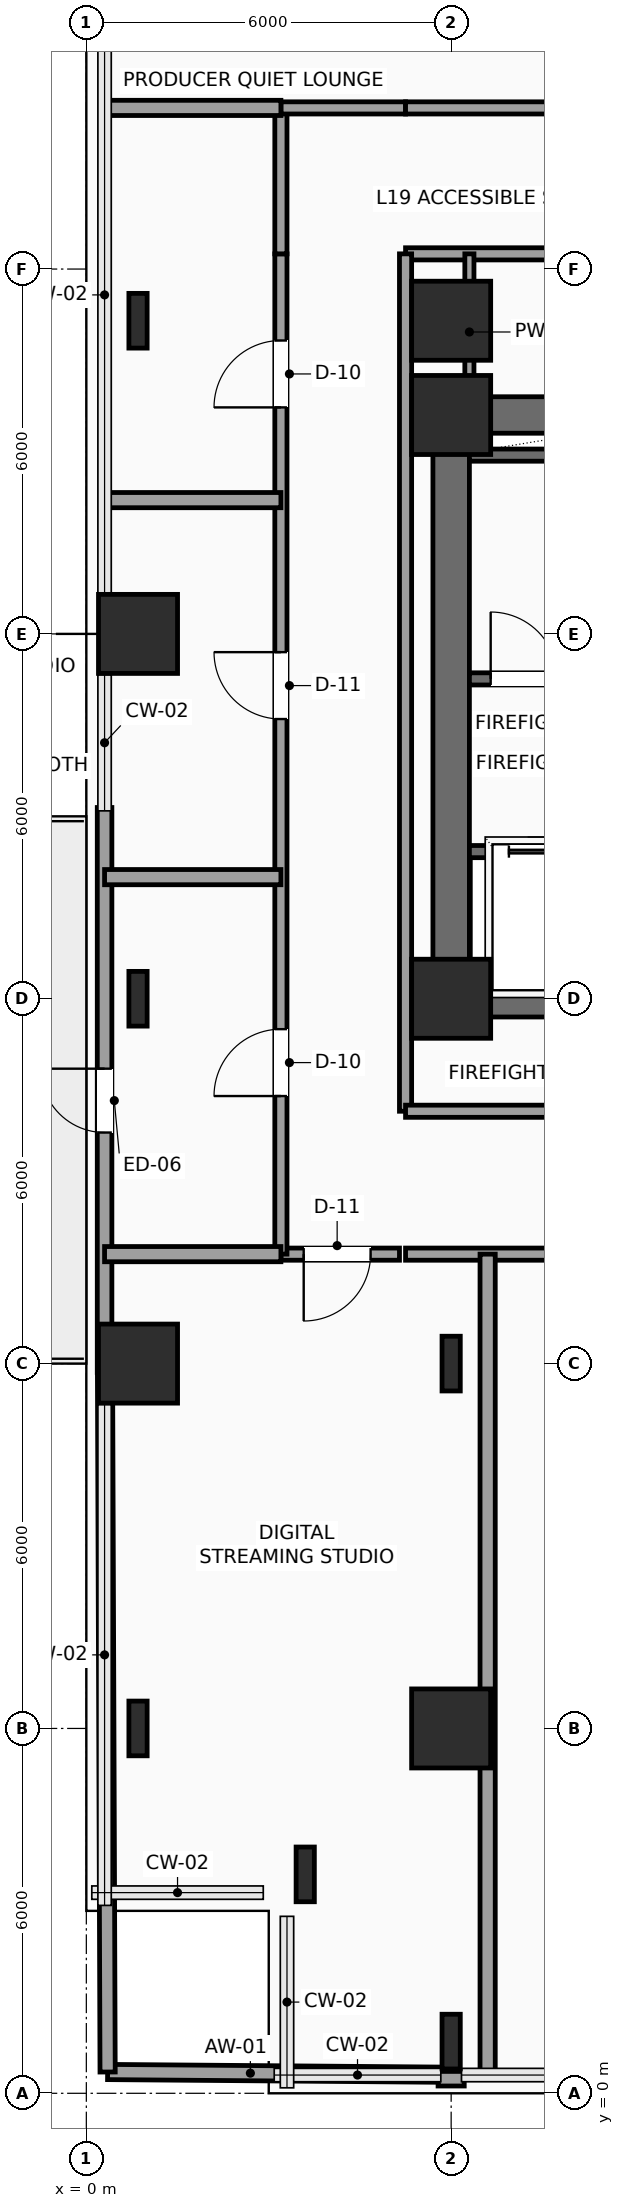
"""IFC4 building model, lengths in metres.
Left out: names, types, materials, properties, quantities, classifications, styles, units other than length and angle.
Written with IfcOpenShell. Run it as: python <this file> out.ifc"""

import sys

from ifc_helpers import new_model, si_unit, direction, frame, frame_2d, origin, origin_2d, place, context, subcontext, project, spatial, rectangle, i_section, extrude, element, fill, save


model = new_model("IFC4")
c1 = context("Model", 3, precision=1e-05, world=origin(), true_north=direction((0.0, 1.0)))
c2 = subcontext(c1, "Body", "Model", "MODEL_VIEW")
j1 = project(units=[si_unit("LENGTHUNIT", "METRE"), si_unit("PLANEANGLEUNIT", "RADIAN")], contexts=[c1])
p1 = place(None, origin())
s1 = spatial("IfcSite", under=j1, at=p1, CompositionType="ELEMENT")
p2 = place(p1, origin())
s2 = spatial("IfcBuilding", under=s1, at=p2, CompositionType="ELEMENT")
p3 = place(p2, frame((0.0, 0.0, 83.1)))
s3 = spatial("IfcBuildingStorey", under=s2, at=p3, CompositionType="ELEMENT", Elevation=83.1)
for number, where, z_axis, x_axis in (
    (1, (6.0, 18.0, 0.0), (0.0, 0.0, 1.0), (1.0, 0.0, 0.0)),
    (2, (6.0, 27.6, 0.0), (0.0, 0.0, 1.0), (1.0, 0.0, 0.0)),
):
    element("IfcColumn", number, at=place(p3, frame(where, z_axis=z_axis, x_axis=x_axis)), inside=s3, PredefinedType="COLUMN", context=c2, shape_type="SweptSolid", body=[
        extrude(rectangle(XDim=1.3, YDim=1.3, at=origin_2d()), origin(), (0.0, 0.0, 1.0), 3.9),
    ])
for number, where, z_axis, x_axis in (
    (3, (3.6, 3.6, 0.0), (0.0, 0.0, 1.0), (1.0, 0.0, 0.0)),
    (4, (0.85, 6.0, 0.0), (0.0, 0.0, 1.0), (1.0, 0.0, 0.0)),
):
    element("IfcColumn", number, at=place(p3, frame(where, z_axis=z_axis, x_axis=x_axis)), inside=s3, PredefinedType="COLUMN", context=c2, shape_type="SweptSolid", body=[
        extrude(i_section(OverallWidth=0.3, OverallDepth=0.9, WebThickness=0.019, FlangeThickness=0.035, FilletRadius=0.03, at=origin_2d()), origin(), (0.0, 0.0, 1.0), 3.9),
    ])
p4 = place(p3, frame((0.85, 12.0, 0.0), z_axis=(0.0, 0.0, 1.0), x_axis=(1.0, 0.0, 0.0)))
e5 = element("IfcColumn", 5, at=p4, inside=s3, PredefinedType="COLUMN", context=c2, shape_type="SweptSolid", body=[
    extrude(rectangle(XDim=1.3, YDim=1.3, at=origin_2d()), origin(), (0.0, 0.0, 1.0), 3.9),
])
p5 = place(p3, frame((0.85, 18.0, 0.0), z_axis=(0.0, 0.0, 1.0), x_axis=(1.0, 0.0, 0.0)))
e6 = element("IfcColumn", 6, at=p5, inside=s3, PredefinedType="COLUMN", context=c2, shape_type="SweptSolid", body=[
    extrude(i_section(OverallWidth=0.3, OverallDepth=0.9, WebThickness=0.019, FlangeThickness=0.035, FilletRadius=0.03, at=origin_2d()), origin(), (0.0, 0.0, 1.0), 3.9),
])
p6 = place(p3, frame((0.85, 24.0, 0.0), z_axis=(0.0, 0.0, 1.0), x_axis=(1.0, 0.0, 0.0)))
e7 = element("IfcColumn", 7, at=p6, inside=s3, PredefinedType="COLUMN", context=c2, shape_type="SweptSolid", body=[
    extrude(rectangle(XDim=1.3, YDim=1.3, at=origin_2d()), origin(), (0.0, 0.0, 1.0), 3.9),
])
for number, where, z_axis, x_axis in (
    (8, (0.85, 29.15, 0.0), (0.0, 0.0, 1.0), (1.0, 0.0, 0.0)),
    (9, (6.0, 0.85, 0.0), (0.0, 0.0, 1.0), (1.0, 0.0, 0.0)),
):
    element("IfcColumn", number, at=place(p3, frame(where, z_axis=z_axis, x_axis=x_axis)), inside=s3, PredefinedType="COLUMN", context=c2, shape_type="SweptSolid", body=[
        extrude(i_section(OverallWidth=0.3, OverallDepth=0.9, WebThickness=0.019, FlangeThickness=0.035, FilletRadius=0.03, at=origin_2d()), origin(), (0.0, 0.0, 1.0), 3.9),
    ])
p7 = place(p3, frame((6.0, 6.0, 0.0), z_axis=(0.0, 0.0, 1.0), x_axis=(1.0, 0.0, 0.0)))
e10 = element("IfcColumn", 10, at=p7, inside=s3, PredefinedType="COLUMN", context=c2, shape_type="SweptSolid", body=[
    extrude(rectangle(XDim=1.3, YDim=1.3, at=origin_2d()), origin(), (0.0, 0.0, 1.0), 3.9),
])
p8 = place(p3, frame((6.0, 12.0, 0.0), z_axis=(0.0, 0.0, 1.0), x_axis=(1.0, 0.0, 0.0)))
e11 = element("IfcColumn", 11, at=p8, inside=s3, PredefinedType="COLUMN", context=c2, shape_type="SweptSolid", body=[
    extrude(i_section(OverallWidth=0.3, OverallDepth=0.9, WebThickness=0.019, FlangeThickness=0.035, FilletRadius=0.03, at=origin_2d()), origin(), (0.0, 0.0, 1.0), 3.9),
])
p9 = place(p3, frame((6.0, 29.15, 0.0), z_axis=(0.0, 0.0, 1.0), x_axis=(1.0, 0.0, 0.0)))
e12 = element("IfcColumn", 12, at=p9, inside=s3, PredefinedType="COLUMN", context=c2, shape_type="SweptSolid", body=[
    extrude(rectangle(XDim=1.3, YDim=1.3, at=origin_2d()), origin(), (0.0, 0.0, 1.0), 3.9),
])
p10 = place(p3, frame((0.3, 11.855, 0.0), z_axis=(0.0, 0.0, 1.0), x_axis=(0.0, 1.0, 0.0)))
e13 = element("IfcWall", 13, at=p10, inside=s3, PredefinedType="SOLIDWALL", context=c2, shape_type="SweptSolid", body=[
    extrude(rectangle(XDim=9.29, YDim=0.24, at=frame_2d((4.645, 0.0))), origin(), (0.0, 0.0, 1.0), 3.65),
])
p11 = place(p10, frame((3.945, 0.0, 0.0)))
e14 = element("IfcOpeningElement", 14, at=p11, cuts=e13, PredefinedType="OPENING", context=c2, shape_type="SweptSolid", body=[
    extrude(rectangle(XDim=1.05, YDim=2.2, at=frame_2d((0.525, 1.1))), frame((0.0, 0.13, 0.0), z_axis=(0.0, -1.0, 0.0), x_axis=(1.0, 0.0, 0.0)), (0.0, 0.0, 1.0), 0.26),
])
p12 = place(p3, frame((6.215, 0.24, 0.0), z_axis=(0.0, 0.0, 1.0), x_axis=(-1.0, 0.0, 0.0)))
e15 = element("IfcWall", 15, at=p12, inside=s3, PredefinedType="SOLIDWALL", context=c2, shape_type="SweptSolid", body=[
    extrude(rectangle(XDim=0.43, YDim=0.24, at=frame_2d((0.215, 0.0))), origin(), (0.0, 0.0, 1.0), 3.65),
])
p13 = place(p3, frame((6.0, 18.0, 0.0), z_axis=(0.0, 0.0, 1.0), x_axis=(1.0, 0.0, 0.0)))
e16 = element("IfcWall", 16, at=p13, inside=s3, PredefinedType="SHEAR", context=c2, shape_type="SweptSolid", body=[
    extrude(rectangle(XDim=12.0, YDim=0.6, at=frame_2d((6.0, 0.0))), origin(), (0.0, 0.0, 1.0), 3.65),
])
p14 = place(p13, frame((7.15, 0.0, 0.0)))
e17 = element("IfcOpeningElement", 17, at=p14, cuts=e16, PredefinedType="OPENING", context=c2, shape_type="SweptSolid", body=[
    extrude(rectangle(XDim=1.6, YDim=2.3, at=frame_2d((0.8, 1.15))), frame((0.0, 0.31, 0.0), z_axis=(0.0, -1.0, 0.0), x_axis=(1.0, 0.0, 0.0)), (0.0, 0.0, 1.0), 0.62),
])
p15 = place(p3, frame((6.0, 27.6, 0.0), z_axis=(0.0, 0.0, 1.0), x_axis=(1.0, 0.0, 0.0)))
e18 = element("IfcWall", 18, at=p15, inside=s3, PredefinedType="SHEAR", context=c2, shape_type="SweptSolid", body=[
    extrude(rectangle(XDim=12.0, YDim=0.6, at=frame_2d((6.0, 0.0))), origin(), (0.0, 0.0, 1.0), 3.65),
])
p16 = place(p15, frame((10.2, 0.0, 0.0)))
e19 = element("IfcOpeningElement", 19, at=p16, cuts=e18, PredefinedType="OPENING", context=c2, shape_type="SweptSolid", body=[
    extrude(rectangle(XDim=0.9, YDim=2.15, at=frame_2d((0.45, 1.075))), frame((0.0, 0.31, 0.0), z_axis=(0.0, -1.0, 0.0), x_axis=(1.0, 0.0, 0.0)), (0.0, 0.0, 1.0), 0.62),
])
p17 = place(p3, frame((6.0, 18.0, 0.0), z_axis=(0.0, 0.0, 1.0), x_axis=(0.0, 1.0, 0.0)))
e20 = element("IfcWall", 20, at=p17, inside=s3, PredefinedType="SHEAR", context=c2, shape_type="SweptSolid", body=[
    extrude(rectangle(XDim=9.6, YDim=0.6, at=frame_2d((4.8, 0.0))), origin(), (0.0, 0.0, 1.0), 3.65),
])
p18 = place(p3, frame((6.3, 23.26, 0.0), z_axis=(0.0, 0.0, 1.0), x_axis=(1.0, 0.0, 0.0)))
e21 = element("IfcWall", 21, at=p18, inside=s3, PredefinedType="SHEAR", context=c2, shape_type="SweptSolid", body=[
    extrude(rectangle(XDim=8.88, YDim=0.2, at=frame_2d((4.44, 0.0))), origin(), (0.0, 0.0, 1.0), 3.65),
])
p19 = place(p18, frame((0.35, 0.0, 0.0)))
e22 = element("IfcOpeningElement", 22, at=p19, cuts=e21, PredefinedType="OPENING", context=c2, shape_type="SweptSolid", body=[
    extrude(rectangle(XDim=1.1, YDim=2.2, at=frame_2d((0.55, 1.1))), frame((0.0, 0.11, 0.0), z_axis=(0.0, -1.0, 0.0), x_axis=(1.0, 0.0, 0.0)), (0.0, 0.0, 1.0), 0.22),
])
p20 = place(p3, frame((6.3, 26.94, 0.0), z_axis=(0.0, 0.0, 1.0), x_axis=(1.0, 0.0, 0.0)))
e23 = element("IfcWall", 23, at=p20, inside=s3, PredefinedType="SHEAR", context=c2, shape_type="SweptSolid", body=[
    extrude(rectangle(XDim=8.88, YDim=0.2, at=frame_2d((4.44, 0.0))), origin(), (0.0, 0.0, 1.0), 3.65),
])
p21 = place(p3, frame((6.3, 20.42, 0.0), z_axis=(0.0, 0.0, 1.0), x_axis=(1.0, 0.0, 0.0)))
e24 = element("IfcWall", 24, at=p21, inside=s3, PredefinedType="SHEAR", context=c2, shape_type="SweptSolid", body=[
    extrude(rectangle(XDim=4.95, YDim=0.2, at=frame_2d((2.475, 0.0))), origin(), (0.0, 0.0, 1.0), 3.65),
])
p22 = place(p21, frame((0.65, 0.0, 0.0)))
e25 = element("IfcOpeningElement", 25, at=p22, cuts=e24, PredefinedType="OPENING", context=c2, shape_type="SweptSolid", body=[
    extrude(rectangle(XDim=1.1, YDim=2.2, at=frame_2d((0.55, 1.1))), frame((0.0, 0.11, 0.0), z_axis=(0.0, -1.0, 0.0), x_axis=(1.0, 0.0, 0.0)), (0.0, 0.0, 1.0), 0.22),
])
p23 = place(p21, frame((3.05, 0.0, 0.0)))
e26 = element("IfcOpeningElement", 26, at=p23, cuts=e24, PredefinedType="OPENING", context=c2, shape_type="SweptSolid", body=[
    extrude(rectangle(XDim=1.1, YDim=2.2, at=frame_2d((0.55, 1.1))), frame((0.0, 0.11, 0.0), z_axis=(0.0, -1.0, 0.0), x_axis=(1.0, 0.0, 0.0)), (0.0, 0.0, 1.0), 0.22),
])
p24 = place(p3, frame((12.4, 13.8, 0.0), z_axis=(0.0, 0.0, 1.0), x_axis=(-1.0, 0.0, 0.0)))
e27 = element("IfcWall", 27, at=p24, inside=s3, PredefinedType="PARTITIONING", context=c2, shape_type="SweptSolid", body=[
    extrude(rectangle(XDim=7.15, YDim=0.2, at=frame_2d((3.575, 0.0))), origin(), (0.0, 0.0, 1.0), 3.65),
])
p25 = place(p24, frame((2.4, 0.0, 0.0)))
e28 = element("IfcOpeningElement", 28, at=p25, cuts=e27, PredefinedType="OPENING", context=c2, shape_type="SweptSolid", body=[
    extrude(rectangle(XDim=1.1, YDim=2.25, at=frame_2d((0.55, 1.125))), frame((0.0, 0.11, 0.0), z_axis=(0.0, -1.0, 0.0), x_axis=(1.0, 0.0, 0.0)), (0.0, 0.0, 1.0), 0.22),
])
p26 = place(p3, frame((5.15, 13.8, 0.0), z_axis=(0.0, 0.0, 1.0), x_axis=(-1.0, 0.0, 0.0)))
e29 = element("IfcWall", 29, at=p26, inside=s3, PredefinedType="PARTITIONING", context=c2, shape_type="SweptSolid", body=[
    extrude(rectangle(XDim=1.95, YDim=0.2, at=frame_2d((0.975, 0.0))), origin(), (0.0, 0.0, 1.0), 3.65),
])
p27 = place(p26, frame((0.475, 0.0, 0.0)))
e30 = element("IfcOpeningElement", 30, at=p27, cuts=e29, PredefinedType="OPENING", context=c2, shape_type="SweptSolid", body=[
    extrude(rectangle(XDim=1.1, YDim=2.25, at=frame_2d((0.55, 1.125))), frame((0.0, 0.11, 0.0), z_axis=(0.0, -1.0, 0.0), x_axis=(1.0, 0.0, 0.0)), (0.0, 0.0, 1.0), 0.22),
])
p28 = place(p3, frame((3.2, 13.8, 0.0), z_axis=(0.0, 0.0, 1.0), x_axis=(0.0, 1.0, 0.0)))
e31 = element("IfcWall", 31, at=p28, inside=s3, PredefinedType="PARTITIONING", context=c2, shape_type="SweptSolid", body=[
    extrude(rectangle(XDim=16.45, YDim=0.2, at=frame_2d((8.225, 0.0))), origin(), (0.0, 0.0, 1.0), 3.65),
])
p29 = place(p28, frame((2.6, 0.0, 0.0)))
e32 = element("IfcOpeningElement", 32, at=p29, cuts=e31, PredefinedType="OPENING", context=c2, shape_type="SweptSolid", body=[
    extrude(rectangle(XDim=1.1, YDim=2.25, at=frame_2d((0.55, 1.125))), frame((0.0, 0.11, 0.0), z_axis=(0.0, -1.0, 0.0), x_axis=(1.0, 0.0, 0.0)), (0.0, 0.0, 1.0), 0.22),
])
p30 = place(p28, frame((8.8, 0.0, 0.0)))
e33 = element("IfcOpeningElement", 33, at=p30, cuts=e31, PredefinedType="OPENING", context=c2, shape_type="SweptSolid", body=[
    extrude(rectangle(XDim=1.1, YDim=2.25, at=frame_2d((0.55, 1.125))), frame((0.0, 0.11, 0.0), z_axis=(0.0, -1.0, 0.0), x_axis=(1.0, 0.0, 0.0)), (0.0, 0.0, 1.0), 0.22),
])
p31 = place(p28, frame((13.925, 0.0, 0.0)))
e34 = element("IfcOpeningElement", 34, at=p31, cuts=e31, PredefinedType="OPENING", context=c2, shape_type="SweptSolid", body=[
    extrude(rectangle(XDim=1.1, YDim=2.25, at=frame_2d((0.55, 1.125))), frame((0.0, 0.11, 0.0), z_axis=(0.0, -1.0, 0.0), x_axis=(1.0, 0.0, 0.0)), (0.0, 0.0, 1.0), 0.22),
])
p32 = place(p3, frame((3.2, 30.25, 0.0), z_axis=(0.0, 0.0, 1.0), x_axis=(0.0, 1.0, 0.0)))
e35 = element("IfcWall", 35, at=p32, inside=s3, PredefinedType="PARTITIONING", context=c2, shape_type="SweptSolid", body=[
    extrude(rectangle(XDim=2.4, YDim=0.2, at=frame_2d((1.2, 0.0))), origin(), (0.0, 0.0, 1.0), 3.65),
])
p33 = place(p3, frame((3.2, 32.65, 0.0), z_axis=(0.0, 0.0, 1.0), x_axis=(1.0, 0.0, 0.0)))
e36 = element("IfcWall", 36, at=p33, inside=s3, PredefinedType="PARTITIONING", context=c2, shape_type="SweptSolid", body=[
    extrude(rectangle(XDim=2.05, YDim=0.2, at=frame_2d((1.025, 0.0))), origin(), (0.0, 0.0, 1.0), 3.65),
])
p34 = place(p3, frame((5.25, 32.65, 0.0), z_axis=(0.0, 0.0, 1.0), x_axis=(1.0, 0.0, 0.0)))
e37 = element("IfcWall", 37, at=p34, inside=s3, PredefinedType="PARTITIONING", context=c2, shape_type="SweptSolid", body=[
    extrude(rectangle(XDim=7.35, YDim=0.2, at=frame_2d((3.675, 0.0))), origin(), (0.0, 0.0, 1.0), 3.65),
])
p35 = place(p3, frame((15.88, 30.25, 0.0), z_axis=(0.0, 0.0, 1.0), x_axis=(-1.0, 0.0, 0.0)))
e38 = element("IfcWall", 38, at=p35, inside=s3, PredefinedType="PARTITIONING", context=c2, shape_type="SweptSolid", body=[
    extrude(rectangle(XDim=10.63, YDim=0.2, at=frame_2d((5.315, 0.0))), origin(), (0.0, 0.0, 1.0), 3.65),
])
p36 = place(p35, frame((6.13, 0.0, 0.0)))
e39 = element("IfcOpeningElement", 39, at=p36, cuts=e38, PredefinedType="OPENING", context=c2, shape_type="SweptSolid", body=[
    extrude(rectangle(XDim=0.9, YDim=2.1, at=frame_2d((0.45, 1.05))), frame((0.0, 0.11, 0.0), z_axis=(0.0, -1.0, 0.0), x_axis=(1.0, 0.0, 0.0)), (0.0, 0.0, 1.0), 0.22),
])
p37 = place(p3, frame((5.25, 30.25, 0.0), z_axis=(0.0, 0.0, 1.0), x_axis=(0.0, -1.0, 0.0)))
e40 = element("IfcWall", 40, at=p37, inside=s3, PredefinedType="PARTITIONING", context=c2, shape_type="SweptSolid", body=[
    extrude(rectangle(XDim=14.1, YDim=0.2, at=frame_2d((7.05, 0.0))), origin(), (0.0, 0.0, 1.0), 3.65),
])
p38 = place(p3, frame((5.25, 16.15, 0.0), z_axis=(0.0, 0.0, 1.0), x_axis=(1.0, 0.0, 0.0)))
e41 = element("IfcWall", 41, at=p38, inside=s3, PredefinedType="PARTITIONING", context=c2, shape_type="SweptSolid", body=[
    extrude(rectangle(XDim=7.15, YDim=0.2, at=frame_2d((3.575, 0.0))), origin(), (0.0, 0.0, 1.0), 3.65),
])
p39 = place(p3, frame((6.3, 27.68, 0.0), z_axis=(0.0, 0.0, 1.0), x_axis=(0.0, 1.0, 0.0)))
e42 = element("IfcWall", 42, at=p39, inside=s3, PredefinedType="PARTITIONING", context=c2, shape_type="SweptSolid", body=[
    extrude(rectangle(XDim=2.57, YDim=0.15, at=frame_2d((1.285, 0.0))), origin(), (0.0, 0.0, 1.0), 2.992),
])
p40 = place(p3, frame((0.35, 0.35, 0.0), z_axis=(0.0, 0.0, 1.0), x_axis=(0.99996767298, -0.008040708569, 0.0)))
e43 = element("IfcWall", 43, at=p40, inside=s3, PredefinedType="PARTITIONING", context=c2, shape_type="SweptSolid", body=[
    extrude(rectangle(XDim=5.435, YDim=0.25, at=frame_2d((2.718, 0.0))), origin(), (0.0, 0.0, 1.0), 3.65),
])
p41 = place(p3, frame((0.35, 0.35, 0.0), z_axis=(0.0, 0.0, 1.0), x_axis=(-0.003734801216, 0.999993025606, 0.0)))
e44 = element("IfcWall", 44, at=p41, inside=s3, PredefinedType="PARTITIONING", context=c2, shape_type="SweptSolid", body=[
    extrude(rectangle(XDim=11.505, YDim=0.25, at=frame_2d((5.752, 0.0))), origin(), (0.0, 0.0, 1.0), 3.65),
])
p42 = place(p3, frame((6.6, 0.3, 0.0), z_axis=(0.0, 0.0, 1.0), x_axis=(0.0, 1.0, 0.0)))
e45 = element("IfcWall", 45, at=p42, inside=s3, PredefinedType="PARTITIONING", context=c2, shape_type="SweptSolid", body=[
    extrude(rectangle(XDim=13.5, YDim=0.25, at=frame_2d((6.75, 0.0))), origin(), (0.0, 0.0, 1.0), 3.65),
])
for number, where, z_axis, x_axis in (
    (46, (0.3, 13.8, 0.0), (0.0, 0.0, 1.0), (1.0, 0.0, 0.0)),
    (47, (0.3, 20.0, 0.0), (0.0, 0.0, 1.0), (1.0, 0.0, 0.0)),
    (48, (0.3, 26.2, 0.0), (0.0, 0.0, 1.0), (1.0, 0.0, 0.0)),
    (49, (0.3, 32.65, 0.0), (0.0, 0.0, 1.0), (1.0, 0.0, 0.0)),
):
    element("IfcWall", number, at=place(p3, frame(where, z_axis=z_axis, x_axis=x_axis)), inside=s3, PredefinedType="PARTITIONING", context=c2, shape_type="SweptSolid", body=[
        extrude(rectangle(XDim=2.9, YDim=0.25, at=frame_2d((1.45, 0.0))), origin(), (0.0, 0.0, 1.0), 3.65),
    ])
p43 = place(p11, origin())
e50 = element("IfcDoor", 50, at=p43, inside=s3, OperationType="SINGLE_SWING_RIGHT", PredefinedType="DOOR", context=c2, shape_type="SweptSolid", body=[
    extrude(rectangle(XDim=1.05, YDim=2.2, at=frame_2d((0.525, 1.1))), frame((0.0, 0.025, 0.0), z_axis=(0.0, -1.0, 0.0), x_axis=(1.0, 0.0, 0.0)), (0.0, 0.0, 1.0), 0.05),
])
fill(e14, e50)
p44 = place(p19, origin())
e51 = element("IfcDoor", 51, at=p44, inside=s3, OperationType="SINGLE_SWING_LEFT", PredefinedType="DOOR", context=c2, shape_type="SweptSolid", body=[
    extrude(rectangle(XDim=1.1, YDim=2.2, at=frame_2d((0.55, 1.1))), frame((0.0, 0.025, 0.0), z_axis=(0.0, -1.0, 0.0), x_axis=(1.0, 0.0, 0.0)), (0.0, 0.0, 1.0), 0.05),
])
fill(e22, e51)
p45 = place(p22, origin())
e52 = element("IfcDoor", 52, at=p45, inside=s3, OperationType="SLIDING_TO_LEFT", PredefinedType="DOOR", context=c2, shape_type="SweptSolid", body=[
    extrude(rectangle(XDim=1.1, YDim=2.2, at=frame_2d((0.55, 1.1))), frame((0.0, 0.025, 0.0), z_axis=(0.0, -1.0, 0.0), x_axis=(1.0, 0.0, 0.0)), (0.0, 0.0, 1.0), 0.05),
])
fill(e25, e52)
p46 = place(p27, origin())
e53 = element("IfcDoor", 53, at=p46, inside=s3, OperationType="SINGLE_SWING_RIGHT", PredefinedType="DOOR", context=c2, shape_type="SweptSolid", body=[
    extrude(rectangle(XDim=1.1, YDim=2.25, at=frame_2d((0.55, 1.125))), frame((0.0, 0.025, 0.0), z_axis=(0.0, -1.0, 0.0), x_axis=(1.0, 0.0, 0.0)), (0.0, 0.0, 1.0), 0.05),
])
fill(e30, e53)
p47 = place(p29, origin())
e54 = element("IfcDoor", 54, at=p47, inside=s3, OperationType="SINGLE_SWING_LEFT", PredefinedType="DOOR", context=c2, shape_type="SweptSolid", body=[
    extrude(rectangle(XDim=1.1, YDim=2.25, at=frame_2d((0.55, 1.125))), frame((0.0, 0.025, 0.0), z_axis=(0.0, -1.0, 0.0), x_axis=(1.0, 0.0, 0.0)), (0.0, 0.0, 1.0), 0.05),
])
fill(e32, e54)
p48 = place(p30, origin())
e55 = element("IfcDoor", 55, at=p48, inside=s3, OperationType="SINGLE_SWING_RIGHT", PredefinedType="DOOR", context=c2, shape_type="SweptSolid", body=[
    extrude(rectangle(XDim=1.1, YDim=2.25, at=frame_2d((0.55, 1.125))), frame((0.0, 0.025, 0.0), z_axis=(0.0, -1.0, 0.0), x_axis=(1.0, 0.0, 0.0)), (0.0, 0.0, 1.0), 0.05),
])
fill(e33, e55)
p49 = place(p31, origin())
e56 = element("IfcDoor", 56, at=p49, inside=s3, OperationType="SINGLE_SWING_LEFT", PredefinedType="DOOR", context=c2, shape_type="SweptSolid", body=[
    extrude(rectangle(XDim=1.1, YDim=2.25, at=frame_2d((0.55, 1.125))), frame((0.0, 0.025, 0.0), z_axis=(0.0, -1.0, 0.0), x_axis=(1.0, 0.0, 0.0)), (0.0, 0.0, 1.0), 0.05),
])
fill(e34, e56)
save(model, sys.argv[1])
